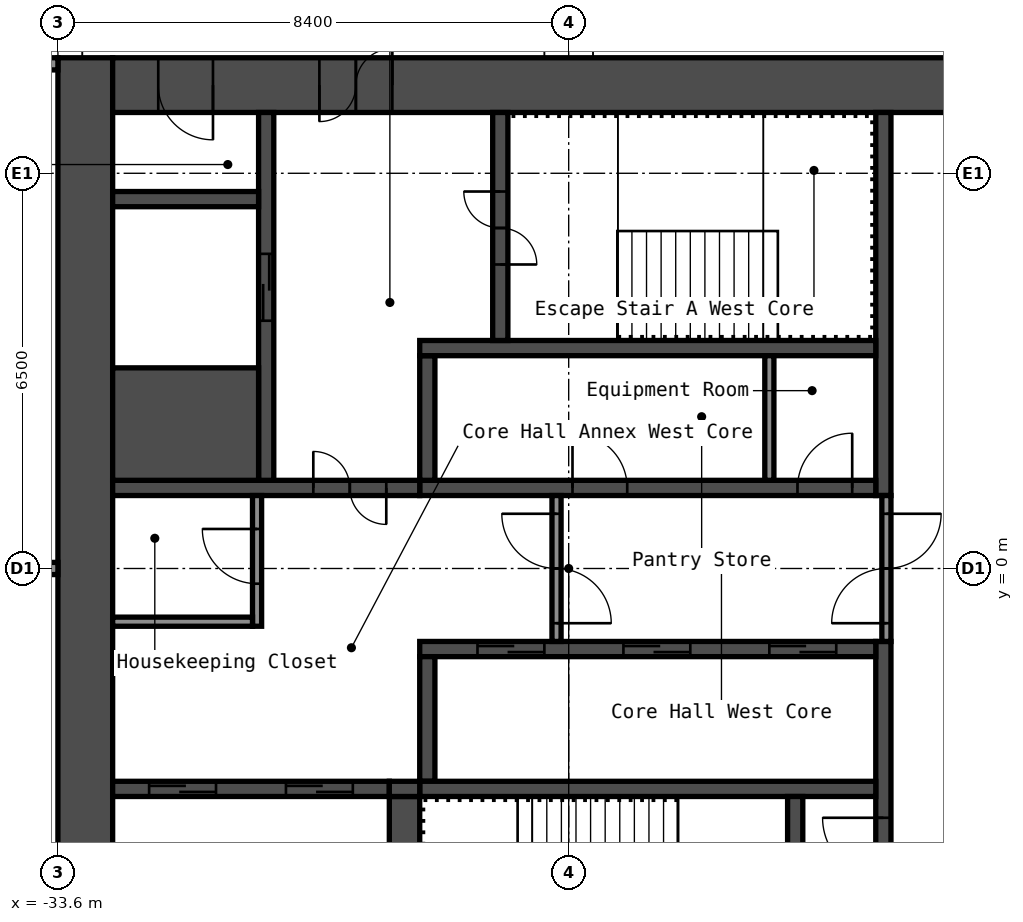
"""IFC4 building model, lengths in metres.
Left out: names, types, materials, properties, quantities, classifications, styles, units other than length and angle.
Written with IfcOpenShell. Run it as: python <this file> out.ifc"""

import sys

from ifc_helpers import new_model, si_unit, direction, frame, frame_2d, origin, place, context, subcontext, project, spatial, rectangle, extrude, element, fill, save


model = new_model("IFC4")
c1 = context("Model", 3, precision=1e-05, world=origin(), true_north=direction((0.0, 1.0)))
c2 = subcontext(c1, "Body", "Model", "MODEL_VIEW")
j1 = project(units=[si_unit("LENGTHUNIT", "METRE"), si_unit("PLANEANGLEUNIT", "RADIAN")], contexts=[c1])
p1 = place(None, origin())
s1 = spatial("IfcSite", under=j1, at=p1, CompositionType="ELEMENT")
p2 = place(p1, origin())
s2 = spatial("IfcBuilding", under=s1, at=p2, CompositionType="ELEMENT")
p3 = place(p2, frame((0.0, 0.0, 175.8)))
s3 = spatial("IfcBuildingStorey", under=s2, at=p3, CompositionType="ELEMENT", Elevation=175.8)
p4 = place(p3, frame((-33.15, -8.4, 0.0), z_axis=(0.0, 0.0, 1.0), x_axis=(0.0, 1.0, 0.0)))
e1 = element("IfcWall", 1, at=p4, inside=s3, PredefinedType="SHEAR", context=c2, shape_type="SweptSolid", body=[
    extrude(rectangle(XDim=16.8, YDim=0.9, at=frame_2d((8.4, 0.0))), origin(), (0.0, 0.0, 1.0), 4.1),
])
p5 = place(p3, frame((-32.7, 7.95, 0.0), z_axis=(0.0, 0.0, 1.0), x_axis=(1.0, 0.0, 0.0)))
e2 = element("IfcWall", 2, at=p5, inside=s3, PredefinedType="SHEAR", context=c2, shape_type="SweptSolid", body=[
    extrude(rectangle(XDim=15.0, YDim=0.9, at=frame_2d((7.5, 0.0))), origin(), (0.0, 0.0, 1.0), 4.1),
])
p6 = place(p5, frame((3.4, 0.0, 0.0)))
e3 = element("IfcOpeningElement", 3, at=p6, cuts=e2, PredefinedType="OPENING", context=c2, shape_type="SweptSolid", body=[
    extrude(rectangle(XDim=1.2, YDim=2.1, at=frame_2d((0.6, 1.05))), frame((0.0, 0.46, 0.0), z_axis=(0.0, -1.0, 0.0), x_axis=(1.0, 0.0, 0.0)), (0.0, 0.0, 1.0), 0.92),
])
p7 = place(p5, frame((0.75, 0.0, 0.0)))
e4 = element("IfcOpeningElement", 4, at=p7, cuts=e2, PredefinedType="OPENING", context=c2, shape_type="SweptSolid", body=[
    extrude(rectangle(XDim=0.9, YDim=2.1, at=frame_2d((0.45, 1.05))), frame((0.0, 0.46, 0.0), z_axis=(0.0, -1.0, 0.0), x_axis=(1.0, 0.0, 0.0)), (0.0, 0.0, 1.0), 0.92),
])
p8 = place(p3, frame((-20.025, 1.2, 0.0), z_axis=(0.0, 0.0, 1.0), x_axis=(0.0, 1.0, 0.0)))
e5 = element("IfcWall", 5, at=p8, inside=s3, PredefinedType="SHEAR", context=c2, shape_type="SweptSolid", body=[
    extrude(rectangle(XDim=6.3, YDim=0.25, at=frame_2d((3.15, 0.0))), origin(), (0.0, 0.0, 1.0), 4.1),
])
p9 = place(p3, frame((-20.025, -7.5, 0.0), z_axis=(0.0, 0.0, 1.0), x_axis=(0.0, 1.0, 0.0)))
e6 = element("IfcWall", 6, at=p9, inside=s3, PredefinedType="SHEAR", context=c2, shape_type="SweptSolid", body=[
    extrude(rectangle(XDim=6.3, YDim=0.25, at=frame_2d((3.15, 0.0))), origin(), (0.0, 0.0, 1.0), 4.1),
])
p10 = place(p9, frame((2.4, 0.0, 0.0)))
e7 = element("IfcOpeningElement", 7, at=p10, cuts=e6, PredefinedType="OPENING", context=c2, shape_type="SweptSolid", body=[
    extrude(rectangle(XDim=1.0, YDim=2.1, at=frame_2d((0.5, 1.05))), frame((0.0, 0.135, 0.0), z_axis=(0.0, -1.0, 0.0), x_axis=(1.0, 0.0, 0.0)), (0.0, 0.0, 1.0), 0.27),
])
p11 = place(p3, frame((-27.65, 1.325, 0.0), z_axis=(0.0, 0.0, 1.0), x_axis=(1.0, 0.0, 0.0)))
e8 = element("IfcWall", 8, at=p11, inside=s3, PredefinedType="SHEAR", context=c2, shape_type="SweptSolid", body=[
    extrude(rectangle(XDim=7.5, YDim=0.25, at=frame_2d((3.75, 0.0))), origin(), (0.0, 0.0, 1.0), 4.1),
])
p12 = place(p11, frame((6.212, 0.0, 0.0)))
e9 = element("IfcOpeningElement", 9, at=p12, cuts=e8, PredefinedType="OPENING", context=c2, shape_type="SweptSolid", body=[
    extrude(rectangle(XDim=0.9, YDim=2.1, at=frame_2d((0.45, 1.05))), frame((0.0, 0.135, 0.0), z_axis=(0.0, -1.0, 0.0), x_axis=(1.0, 0.0, 0.0)), (0.0, 0.0, 1.0), 0.27),
])
p13 = place(p11, frame((2.512, 0.0, 0.0)))
e10 = element("IfcOpeningElement", 10, at=p13, cuts=e8, PredefinedType="OPENING", context=c2, shape_type="SweptSolid", body=[
    extrude(rectangle(XDim=0.9, YDim=2.1, at=frame_2d((0.45, 1.05))), frame((0.0, 0.135, 0.0), z_axis=(0.0, -1.0, 0.0), x_axis=(1.0, 0.0, 0.0)), (0.0, 0.0, 1.0), 0.27),
])
p14 = place(p3, frame((-27.525, 1.45, 0.0), z_axis=(0.0, 0.0, 1.0), x_axis=(0.0, 1.0, 0.0)))
e11 = element("IfcWall", 11, at=p14, inside=s3, PredefinedType="SHEAR", context=c2, shape_type="SweptSolid", body=[
    extrude(rectangle(XDim=2.05, YDim=0.25, at=frame_2d((1.025, 0.0))), origin(), (0.0, 0.0, 1.0), 4.1),
])
p15 = place(p3, frame((-27.65, 3.625, 0.0), z_axis=(0.0, 0.0, 1.0), x_axis=(1.0, 0.0, 0.0)))
e12 = element("IfcWall", 12, at=p15, inside=s3, PredefinedType="SHEAR", context=c2, shape_type="SweptSolid", body=[
    extrude(rectangle(XDim=7.5, YDim=0.25, at=frame_2d((3.75, 0.0))), origin(), (0.0, 0.0, 1.0), 4.1),
])
p16 = place(p3, frame((-26.325, 3.75, 0.0), z_axis=(0.0, 0.0, 1.0), x_axis=(0.0, 1.0, 0.0)))
e13 = element("IfcWall", 13, at=p16, inside=s3, PredefinedType="SHEAR", context=c2, shape_type="SweptSolid", body=[
    extrude(rectangle(XDim=3.75, YDim=0.25, at=frame_2d((1.875, 0.0))), origin(), (0.0, 0.0, 1.0), 4.1),
])
p17 = place(p16, frame((1.25, 0.0, 0.0)))
e14 = element("IfcOpeningElement", 14, at=p17, cuts=e13, PredefinedType="OPENING", context=c2, shape_type="SweptSolid", body=[
    extrude(rectangle(XDim=1.2, YDim=2.1, at=frame_2d((0.6, 1.05))), frame((0.0, 0.135, 0.0), z_axis=(0.0, -1.0, 0.0), x_axis=(1.0, 0.0, 0.0)), (0.0, 0.0, 1.0), 0.27),
])
p18 = place(p3, frame((-32.7, 1.325, 0.0), z_axis=(0.0, 0.0, 1.0), x_axis=(1.0, 0.0, 0.0)))
e15 = element("IfcWall", 15, at=p18, inside=s3, PredefinedType="SHEAR", context=c2, shape_type="SweptSolid", body=[
    extrude(rectangle(XDim=5.05, YDim=0.25, at=frame_2d((2.525, 0.0))), origin(), (0.0, 0.0, 1.0), 4.1),
])
p19 = place(p18, frame((3.3, 0.0, 0.0)))
e16 = element("IfcOpeningElement", 16, at=p19, cuts=e15, PredefinedType="OPENING", context=c2, shape_type="SweptSolid", body=[
    extrude(rectangle(XDim=1.2, YDim=2.1, at=frame_2d((0.6, 1.05))), frame((0.0, 0.135, 0.0), z_axis=(0.0, -1.0, 0.0), x_axis=(1.0, 0.0, 0.0)), (0.0, 0.0, 1.0), 0.27),
])
p20 = place(p3, frame((-30.175, 1.45, 0.0), z_axis=(0.0, 0.0, 1.0), x_axis=(0.0, 1.0, 0.0)))
e17 = element("IfcWall", 17, at=p20, inside=s3, PredefinedType="SHEAR", context=c2, shape_type="SweptSolid", body=[
    extrude(rectangle(XDim=6.05, YDim=0.25, at=frame_2d((3.025, 0.0))), origin(), (0.0, 0.0, 1.0), 4.1),
])
p21 = place(p20, frame((2.625, 0.0, 0.0)))
e18 = element("IfcOpeningElement", 18, at=p21, cuts=e17, PredefinedType="OPENING", context=c2, shape_type="SweptSolid", body=[
    extrude(rectangle(XDim=1.1, YDim=2.1, at=frame_2d((0.55, 1.05))), frame((0.0, 0.135, 0.0), z_axis=(0.0, -1.0, 0.0), x_axis=(1.0, 0.0, 0.0)), (0.0, 0.0, 1.0), 0.27),
])
p22 = place(p3, frame((-32.7, 2.375, 0.0), z_axis=(0.0, 0.0, 1.0), x_axis=(1.0, 0.0, 0.0)))
e19 = element("IfcWall", 19, at=p22, inside=s3, PredefinedType="SHEAR", context=c2, shape_type="SweptSolid", body=[
    extrude(rectangle(XDim=2.4, YDim=1.85, at=frame_2d((1.2, 0.0))), origin(), (0.0, 0.0, 1.0), 4.1),
])
p23 = place(p3, frame((-32.7, 6.075, 0.0), z_axis=(0.0, 0.0, 1.0), x_axis=(1.0, 0.0, 0.0)))
e20 = element("IfcWall", 20, at=p23, inside=s3, PredefinedType="SHEAR", context=c2, shape_type="SweptSolid", body=[
    extrude(rectangle(XDim=2.4, YDim=0.25, at=frame_2d((1.2, 0.0))), origin(), (0.0, 0.0, 1.0), 4.1),
])
p24 = place(p3, frame((-27.65, -1.325, 0.0), z_axis=(0.0, 0.0, 1.0), x_axis=(1.0, 0.0, 0.0)))
e21 = element("IfcWall", 21, at=p24, inside=s3, PredefinedType="SHEAR", context=c2, shape_type="SweptSolid", body=[
    extrude(rectangle(XDim=7.5, YDim=0.25, at=frame_2d((3.75, 0.0))), origin(), (0.0, 0.0, 1.0), 4.1),
])
p25 = place(p24, frame((5.75, 0.0, 0.0)))
e22 = element("IfcOpeningElement", 22, at=p25, cuts=e21, PredefinedType="OPENING", context=c2, shape_type="SweptSolid", body=[
    extrude(rectangle(XDim=1.1, YDim=2.1, at=frame_2d((0.55, 1.05))), frame((0.0, 0.135, 0.0), z_axis=(0.0, -1.0, 0.0), x_axis=(1.0, 0.0, 0.0)), (0.0, 0.0, 1.0), 0.27),
])
p26 = place(p24, frame((3.35, 0.0, 0.0)))
e23 = element("IfcOpeningElement", 23, at=p26, cuts=e21, PredefinedType="OPENING", context=c2, shape_type="SweptSolid", body=[
    extrude(rectangle(XDim=1.1, YDim=2.1, at=frame_2d((0.55, 1.05))), frame((0.0, 0.135, 0.0), z_axis=(0.0, -1.0, 0.0), x_axis=(1.0, 0.0, 0.0)), (0.0, 0.0, 1.0), 0.27),
])
p27 = place(p24, frame((0.95, 0.0, 0.0)))
e24 = element("IfcOpeningElement", 24, at=p27, cuts=e21, PredefinedType="OPENING", context=c2, shape_type="SweptSolid", body=[
    extrude(rectangle(XDim=1.1, YDim=2.1, at=frame_2d((0.55, 1.05))), frame((0.0, 0.135, 0.0), z_axis=(0.0, -1.0, 0.0), x_axis=(1.0, 0.0, 0.0)), (0.0, 0.0, 1.0), 0.27),
])
p28 = place(p3, frame((-27.525, -3.5, 0.0), z_axis=(0.0, 0.0, 1.0), x_axis=(0.0, 1.0, 0.0)))
e25 = element("IfcWall", 25, at=p28, inside=s3, PredefinedType="SHEAR", context=c2, shape_type="SweptSolid", body=[
    extrude(rectangle(XDim=2.05, YDim=0.25, at=frame_2d((1.025, 0.0))), origin(), (0.0, 0.0, 1.0), 4.1),
])
p29 = place(p3, frame((-27.65, -3.625, 0.0), z_axis=(0.0, 0.0, 1.0), x_axis=(1.0, 0.0, 0.0)))
e26 = element("IfcWall", 26, at=p29, inside=s3, PredefinedType="SHEAR", context=c2, shape_type="SweptSolid", body=[
    extrude(rectangle(XDim=7.5, YDim=0.25, at=frame_2d((3.75, 0.0))), origin(), (0.0, 0.0, 1.0), 4.1),
])
p30 = place(p3, frame((-21.475, -7.5, 0.0), z_axis=(0.0, 0.0, 1.0), x_axis=(0.0, 1.0, 0.0)))
e27 = element("IfcWall", 27, at=p30, inside=s3, PredefinedType="SHEAR", context=c2, shape_type="SweptSolid", body=[
    extrude(rectangle(XDim=3.75, YDim=0.25, at=frame_2d((1.875, 0.0))), origin(), (0.0, 0.0, 1.0), 4.1),
])
p31 = place(p30, frame((1.3, 0.0, 0.0)))
e28 = element("IfcOpeningElement", 28, at=p31, cuts=e27, PredefinedType="OPENING", context=c2, shape_type="SweptSolid", body=[
    extrude(rectangle(XDim=1.2, YDim=2.1, at=frame_2d((0.6, 1.05))), frame((0.0, 0.135, 0.0), z_axis=(0.0, -1.0, 0.0), x_axis=(1.0, 0.0, 0.0)), (0.0, 0.0, 1.0), 0.27),
])
p32 = place(p3, frame((-27.9, -7.5, 0.0), z_axis=(0.0, 0.0, 1.0), x_axis=(0.0, 1.0, 0.0)))
e29 = element("IfcWall", 29, at=p32, inside=s3, PredefinedType="SHEAR", context=c2, shape_type="SweptSolid", body=[
    extrude(rectangle(XDim=3.75, YDim=0.5, at=frame_2d((1.875, 0.0))), origin(), (0.0, 0.0, 1.0), 4.1),
])
p33 = place(p3, frame((-32.7, -3.625, 0.0), z_axis=(0.0, 0.0, 1.0), x_axis=(1.0, 0.0, 0.0)))
e30 = element("IfcWall", 30, at=p33, inside=s3, PredefinedType="SHEAR", context=c2, shape_type="SweptSolid", body=[
    extrude(rectangle(XDim=4.55, YDim=0.25, at=frame_2d((2.275, 0.0))), origin(), (0.0, 0.0, 1.0), 4.1),
])
p34 = place(p33, frame((2.85, 0.0, 0.0)))
e31 = element("IfcOpeningElement", 31, at=p34, cuts=e30, PredefinedType="OPENING", context=c2, shape_type="SweptSolid", body=[
    extrude(rectangle(XDim=1.1, YDim=2.1, at=frame_2d((0.55, 1.05))), frame((0.0, 0.135, 0.0), z_axis=(0.0, -1.0, 0.0), x_axis=(1.0, 0.0, 0.0)), (0.0, 0.0, 1.0), 0.27),
])
p35 = place(p33, frame((0.6, 0.0, 0.0)))
e32 = element("IfcOpeningElement", 32, at=p35, cuts=e30, PredefinedType="OPENING", context=c2, shape_type="SweptSolid", body=[
    extrude(rectangle(XDim=1.1, YDim=2.1, at=frame_2d((0.55, 1.05))), frame((0.0, 0.135, 0.0), z_axis=(0.0, -1.0, 0.0), x_axis=(1.0, 0.0, 0.0)), (0.0, 0.0, 1.0), 0.27),
])
p36 = place(p3, frame((-28.15, -3.625, 0.0), z_axis=(0.0, 0.0, 1.0), x_axis=(1.0, 0.0, 0.0)))
e33 = element("IfcWall", 33, at=p36, inside=s3, PredefinedType="SHEAR", context=c2, shape_type="SweptSolid", body=[
    extrude(rectangle(XDim=0.5, YDim=0.25, at=frame_2d((0.25, 0.0))), origin(), (0.0, 0.0, 1.0), 4.1),
])
p37 = place(p3, frame((-19.975, -1.2, 0.0), z_axis=(0.0, 0.0, 1.0), x_axis=(0.0, 1.0, 0.0)))
e34 = element("IfcWall", 34, at=p37, inside=s3, PredefinedType="PARTITIONING", context=c2, shape_type="SweptSolid", body=[
    extrude(rectangle(XDim=2.4, YDim=0.15, at=frame_2d((1.2, 0.0))), origin(), (0.0, 0.0, 1.0), 4.1),
])
p38 = place(p37, frame((0.3, 0.0, 0.0)))
e35 = element("IfcOpeningElement", 35, at=p38, cuts=e34, PredefinedType="OPENING", context=c2, shape_type="SweptSolid", body=[
    extrude(rectangle(XDim=1.8, YDim=2.1, at=frame_2d((0.9, 1.05))), frame((0.0, 0.085, 0.0), z_axis=(0.0, -1.0, 0.0), x_axis=(1.0, 0.0, 0.0)), (0.0, 0.0, 1.0), 0.17),
])
p39 = place(p3, frame((-25.4, -1.2, 0.0), z_axis=(0.0, 0.0, 1.0), x_axis=(0.0, 1.0, 0.0)))
e36 = element("IfcWall", 36, at=p39, inside=s3, PredefinedType="PARTITIONING", context=c2, shape_type="SweptSolid", body=[
    extrude(rectangle(XDim=2.4, YDim=0.15, at=frame_2d((1.2, 0.0))), origin(), (0.0, 0.0, 1.0), 4.1),
])
p40 = place(p39, frame((0.3, 0.0, 0.0)))
e37 = element("IfcOpeningElement", 37, at=p40, cuts=e36, PredefinedType="OPENING", context=c2, shape_type="SweptSolid", body=[
    extrude(rectangle(XDim=1.8, YDim=2.1, at=frame_2d((0.9, 1.05))), frame((0.0, 0.085, 0.0), z_axis=(0.0, -1.0, 0.0), x_axis=(1.0, 0.0, 0.0)), (0.0, 0.0, 1.0), 0.17),
])
p41 = place(p3, frame((-30.325, -0.95, 0.0), z_axis=(0.0, 0.0, 1.0), x_axis=(0.0, 1.0, 0.0)))
e38 = element("IfcWall", 38, at=p41, inside=s3, PredefinedType="PARTITIONING", context=c2, shape_type="SweptSolid", body=[
    extrude(rectangle(XDim=2.15, YDim=0.15, at=frame_2d((1.075, 0.0))), origin(), (0.0, 0.0, 1.0), 4.1),
])
p42 = place(p41, frame((0.7, 0.0, 0.0)))
e39 = element("IfcOpeningElement", 39, at=p42, cuts=e38, PredefinedType="OPENING", context=c2, shape_type="SweptSolid", body=[
    extrude(rectangle(XDim=0.9, YDim=2.1, at=frame_2d((0.45, 1.05))), frame((0.0, 0.085, 0.0), z_axis=(0.0, -1.0, 0.0), x_axis=(1.0, 0.0, 0.0)), (0.0, 0.0, 1.0), 0.17),
])
p43 = place(p3, frame((-32.7, -0.875, 0.0), z_axis=(0.0, 0.0, 1.0), x_axis=(1.0, 0.0, 0.0)))
e40 = element("IfcWall", 40, at=p43, inside=s3, PredefinedType="PARTITIONING", context=c2, shape_type="SweptSolid", body=[
    extrude(rectangle(XDim=2.3, YDim=0.15, at=frame_2d((1.15, 0.0))), origin(), (0.0, 0.0, 1.0), 4.1),
])
p44 = place(p3, frame((-21.9, 1.45, 0.0), z_axis=(0.0, 0.0, 1.0), x_axis=(0.0, 1.0, 0.0)))
e41 = element("IfcWall", 41, at=p44, inside=s3, PredefinedType="PARTITIONING", context=c2, shape_type="SweptSolid", body=[
    extrude(rectangle(XDim=2.05, YDim=0.15, at=frame_2d((1.025, 0.0))), origin(), (0.0, 0.0, 1.0), 4.1),
])
p45 = place(p3, frame((-40.1, 0.0, 0.0), z_axis=(0.0, 0.0, 1.0), x_axis=(1.0, 0.0, 0.0)))
e42 = element("IfcWall", 42, at=p45, inside=s3, PredefinedType="PARTITIONING", context=c2, shape_type="SweptSolid", body=[
    extrude(rectangle(XDim=6.5, YDim=0.2, at=frame_2d((3.25, 0.0))), origin(), (0.0, 0.0, 1.0), 4.1),
])
p46 = place(p3, frame((-40.2, 8.3, 0.0), z_axis=(0.0, 0.0, 1.0), x_axis=(1.0, 0.0, 0.0)))
e43 = element("IfcWall", 43, at=p46, inside=s3, PredefinedType="PARTITIONING", context=c2, shape_type="SweptSolid", body=[
    extrude(rectangle(XDim=6.6, YDim=0.2, at=frame_2d((3.3, 0.0))), origin(), (0.0, 0.0, 1.0), 4.1),
])
p47 = place(p46, frame((2.85, 0.0, 0.0)))
e44 = element("IfcOpeningElement", 44, at=p47, cuts=e43, PredefinedType="OPENING", context=c2, shape_type="SweptSolid", body=[
    extrude(rectangle(XDim=0.9, YDim=2.1, at=frame_2d((0.45, 1.05))), frame((0.0, 0.11, 0.0), z_axis=(0.0, -1.0, 0.0), x_axis=(1.0, 0.0, 0.0)), (0.0, 0.0, 1.0), 0.22),
])
p48 = place(p6, origin())
e45 = element("IfcDoor", 45, at=p48, inside=s3, OperationType="DOUBLE_DOOR_SINGLE_SWING", PredefinedType="DOOR", context=c2, shape_type="SweptSolid", body=[
    extrude(rectangle(XDim=1.2, YDim=2.1, at=frame_2d((0.6, 1.05))), frame((0.0, 0.025, 0.0), z_axis=(0.0, -1.0, 0.0), x_axis=(1.0, 0.0, 0.0)), (0.0, 0.0, 1.0), 0.05),
])
fill(e3, e45)
p49 = place(p7, origin())
e46 = element("IfcDoor", 46, at=p49, inside=s3, OperationType="SINGLE_SWING_RIGHT", PredefinedType="DOOR", context=c2, shape_type="SweptSolid", body=[
    extrude(rectangle(XDim=0.9, YDim=2.1, at=frame_2d((0.45, 1.05))), frame((0.0, 0.025, 0.0), z_axis=(0.0, -1.0, 0.0), x_axis=(1.0, 0.0, 0.0)), (0.0, 0.0, 1.0), 0.05),
])
fill(e4, e46)
p50 = place(p17, origin())
e47 = element("IfcDoor", 47, at=p50, inside=s3, OperationType="DOUBLE_DOOR_SINGLE_SWING", PredefinedType="DOOR", context=c2, shape_type="SweptSolid", body=[
    extrude(rectangle(XDim=1.2, YDim=2.1, at=frame_2d((0.6, 1.05))), frame((0.0, 0.025, 0.0), z_axis=(0.0, -1.0, 0.0), x_axis=(1.0, 0.0, 0.0)), (0.0, 0.0, 1.0), 0.05),
])
fill(e14, e47)
p51 = place(p10, origin())
e48 = element("IfcDoor", 48, at=p51, inside=s3, OperationType="SINGLE_SWING_LEFT", PredefinedType="DOOR", context=c2, shape_type="SweptSolid", body=[
    extrude(rectangle(XDim=1.0, YDim=2.1, at=frame_2d((0.5, 1.05))), frame((0.0, 0.025, 0.0), z_axis=(0.0, -1.0, 0.0), x_axis=(1.0, 0.0, 0.0)), (0.0, 0.0, 1.0), 0.05),
])
fill(e7, e48)
p52 = place(p19, origin())
e49 = element("IfcDoor", 49, at=p52, inside=s3, OperationType="DOUBLE_DOOR_SINGLE_SWING", PredefinedType="DOOR", context=c2, shape_type="SweptSolid", body=[
    extrude(rectangle(XDim=1.2, YDim=2.1, at=frame_2d((0.6, 1.05))), frame((0.0, 0.025, 0.0), z_axis=(0.0, -1.0, 0.0), x_axis=(1.0, 0.0, 0.0)), (0.0, 0.0, 1.0), 0.05),
])
fill(e16, e49)
p53 = place(p38, origin())
e50 = element("IfcDoor", 50, at=p53, inside=s3, OperationType="DOUBLE_DOOR_SINGLE_SWING", PredefinedType="DOOR", context=c2, shape_type="SweptSolid", body=[
    extrude(rectangle(XDim=1.8, YDim=2.1, at=frame_2d((0.9, 1.05))), frame((0.0, 0.025, 0.0), z_axis=(0.0, -1.0, 0.0), x_axis=(1.0, 0.0, 0.0)), (0.0, 0.0, 1.0), 0.05),
])
fill(e35, e50)
p54 = place(p40, origin())
e51 = element("IfcDoor", 51, at=p54, inside=s3, OperationType="DOUBLE_DOOR_SINGLE_SWING", PredefinedType="DOOR", context=c2, shape_type="SweptSolid", body=[
    extrude(rectangle(XDim=1.8, YDim=2.1, at=frame_2d((0.9, 1.05))), frame((0.0, 0.025, 0.0), z_axis=(0.0, -1.0, 0.0), x_axis=(1.0, 0.0, 0.0)), (0.0, 0.0, 1.0), 0.05),
])
fill(e37, e51)
p55 = place(p42, origin())
e52 = element("IfcDoor", 52, at=p55, inside=s3, OperationType="SINGLE_SWING_LEFT", PredefinedType="DOOR", context=c2, shape_type="SweptSolid", body=[
    extrude(rectangle(XDim=0.9, YDim=2.1, at=frame_2d((0.45, 1.05))), frame((0.0, 0.025, 0.0), z_axis=(0.0, -1.0, 0.0), x_axis=(1.0, 0.0, 0.0)), (0.0, 0.0, 1.0), 0.05),
])
fill(e39, e52)
p56 = place(p12, origin())
e53 = element("IfcDoor", 53, at=p56, inside=s3, OperationType="SINGLE_SWING_LEFT", PredefinedType="DOOR", context=c2, shape_type="SweptSolid", body=[
    extrude(rectangle(XDim=0.9, YDim=2.1, at=frame_2d((0.45, 1.05))), frame((0.0, 0.025, 0.0), z_axis=(0.0, -1.0, 0.0), x_axis=(1.0, 0.0, 0.0)), (0.0, 0.0, 1.0), 0.05),
])
fill(e9, e53)
p57 = place(p13, origin())
e54 = element("IfcDoor", 54, at=p57, inside=s3, OperationType="SINGLE_SWING_RIGHT", PredefinedType="DOOR", context=c2, shape_type="SweptSolid", body=[
    extrude(rectangle(XDim=0.9, YDim=2.1, at=frame_2d((0.45, 1.05))), frame((0.0, 0.025, 0.0), z_axis=(0.0, -1.0, 0.0), x_axis=(1.0, 0.0, 0.0)), (0.0, 0.0, 1.0), 0.05),
])
fill(e10, e54)
p58 = place(p25, origin())
e55 = element("IfcDoor", 55, at=p58, inside=s3, OperationType="DOUBLE_DOOR_SLIDING", PredefinedType="DOOR", context=c2, shape_type="SweptSolid", body=[
    extrude(rectangle(XDim=1.1, YDim=2.1, at=frame_2d((0.55, 1.05))), frame((0.0, 0.025, 0.0), z_axis=(0.0, -1.0, 0.0), x_axis=(1.0, 0.0, 0.0)), (0.0, 0.0, 1.0), 0.05),
])
fill(e22, e55)
p59 = place(p26, origin())
e56 = element("IfcDoor", 56, at=p59, inside=s3, OperationType="DOUBLE_DOOR_SLIDING", PredefinedType="DOOR", context=c2, shape_type="SweptSolid", body=[
    extrude(rectangle(XDim=1.1, YDim=2.1, at=frame_2d((0.55, 1.05))), frame((0.0, 0.025, 0.0), z_axis=(0.0, -1.0, 0.0), x_axis=(1.0, 0.0, 0.0)), (0.0, 0.0, 1.0), 0.05),
])
fill(e23, e56)
p60 = place(p27, origin())
e57 = element("IfcDoor", 57, at=p60, inside=s3, OperationType="DOUBLE_DOOR_SLIDING", PredefinedType="DOOR", context=c2, shape_type="SweptSolid", body=[
    extrude(rectangle(XDim=1.1, YDim=2.1, at=frame_2d((0.55, 1.05))), frame((0.0, 0.025, 0.0), z_axis=(0.0, -1.0, 0.0), x_axis=(1.0, 0.0, 0.0)), (0.0, 0.0, 1.0), 0.05),
])
fill(e24, e57)
p61 = place(p21, origin())
e58 = element("IfcDoor", 58, at=p61, inside=s3, OperationType="DOUBLE_DOOR_SLIDING", PredefinedType="DOOR", context=c2, shape_type="SweptSolid", body=[
    extrude(rectangle(XDim=1.1, YDim=2.1, at=frame_2d((0.55, 1.05))), frame((0.0, 0.025, 0.0), z_axis=(0.0, -1.0, 0.0), x_axis=(1.0, 0.0, 0.0)), (0.0, 0.0, 1.0), 0.05),
])
fill(e18, e58)
p62 = place(p34, origin())
e59 = element("IfcDoor", 59, at=p62, inside=s3, OperationType="DOUBLE_DOOR_SLIDING", PredefinedType="DOOR", context=c2, shape_type="SweptSolid", body=[
    extrude(rectangle(XDim=1.1, YDim=2.1, at=frame_2d((0.55, 1.05))), frame((0.0, 0.025, 0.0), z_axis=(0.0, -1.0, 0.0), x_axis=(1.0, 0.0, 0.0)), (0.0, 0.0, 1.0), 0.05),
])
fill(e31, e59)
p63 = place(p35, origin())
e60 = element("IfcDoor", 60, at=p63, inside=s3, OperationType="DOUBLE_DOOR_SLIDING", PredefinedType="DOOR", context=c2, shape_type="SweptSolid", body=[
    extrude(rectangle(XDim=1.1, YDim=2.1, at=frame_2d((0.55, 1.05))), frame((0.0, 0.025, 0.0), z_axis=(0.0, -1.0, 0.0), x_axis=(1.0, 0.0, 0.0)), (0.0, 0.0, 1.0), 0.05),
])
fill(e32, e60)
save(model, sys.argv[1])
